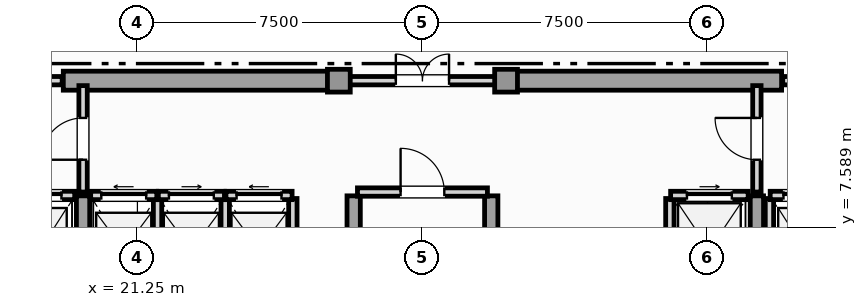
"""IFC4 building model, lengths in metres.
Left out: names, types, materials, properties, quantities, classifications, styles, units other than length and angle.
Written with IfcOpenShell. Run it as: python <this file> out.ifc"""

import sys

from ifc_helpers import new_model, si_unit, direction, frame, frame_2d, origin, origin_2d, place, context, subcontext, project, spatial, rectangle, extrude, element, fill, save


model = new_model("IFC4")
c1 = context("Model", 3, precision=1e-05, world=origin(), true_north=direction((0.0, 1.0)))
c2 = subcontext(c1, "Body", "Model", "MODEL_VIEW")
j1 = project(units=[si_unit("LENGTHUNIT", "METRE"), si_unit("PLANEANGLEUNIT", "RADIAN")], contexts=[c1])
p1 = place(None, origin())
s1 = spatial("IfcSite", under=j1, at=p1, CompositionType="ELEMENT")
p2 = place(p1, origin())
s2 = spatial("IfcBuilding", under=s1, at=p2, CompositionType="ELEMENT")
p3 = place(p2, frame((0.0, 0.0, 357.85)))
s3 = spatial("IfcBuildingStorey", under=s2, at=p3, CompositionType="ELEMENT", Elevation=357.85)
for number, where, z_axis, x_axis in (
    (1, (19.3, 11.45, 0.0), (0.0, 0.0, 1.0), (1.0, 0.0, 0.0)),
    (2, (30.9, 11.45, 0.0), (0.0, 0.0, 1.0), (1.0, 0.0, 0.0)),
):
    element("IfcWall", number, at=place(p3, frame(where, z_axis=z_axis, x_axis=x_axis)), inside=s3, PredefinedType="SHEAR", context=c2, shape_type="SweptSolid", body=[
        extrude(rectangle(XDim=7.3, YDim=0.5, at=frame_2d((3.65, 0.0))), origin(), (0.0, 0.0, 1.0), 4.14),
    ])
for number, where, z_axis, x_axis in (
    (3, (19.82, 0.92, 0.0), (0.0, 0.0, 1.0), (0.0, 1.0, 0.0)),
    (4, (26.94, 0.92, 0.0), (0.0, 0.0, 1.0), (0.0, 1.0, 0.0)),
    (5, (30.56, 0.92, 0.0), (0.0, 0.0, 1.0), (0.0, 1.0, 0.0)),
    (6, (37.55, 0.92, 0.0), (0.0, 0.0, 1.0), (0.0, 1.0, 0.0)),
):
    element("IfcWall", number, at=place(p3, frame(where, z_axis=z_axis, x_axis=x_axis)), inside=s3, PredefinedType="SHEAR", context=c2, shape_type="SweptSolid", body=[
        extrude(rectangle(XDim=7.5, YDim=0.35, at=frame_2d((3.75, 0.0))), origin(), (0.0, 0.0, 1.0), 4.14),
    ])
for number, where, z_axis, x_axis in (
    (7, (26.55, 11.45, 0.0), (0.0, 0.0, 1.0), (1.0, 0.0, 0.0)),
    (8, (30.95, 11.45, 0.0), (0.0, 0.0, 1.0), (1.0, 0.0, 0.0)),
):
    element("IfcColumn", number, at=place(p3, frame(where, z_axis=z_axis, x_axis=x_axis)), inside=s3, PredefinedType="COLUMN", context=c2, shape_type="SweptSolid", body=[
        extrude(rectangle(XDim=0.6, YDim=0.6, at=origin_2d()), origin(), (0.0, 0.0, 1.0), 4.4),
    ])
p4 = place(p3, frame((17.78, 8.43, 0.0), z_axis=(0.0, 0.0, 1.0), x_axis=(1.0, 0.0, 0.0)))
e9 = element("IfcWall", 9, at=p4, inside=s3, PredefinedType="SOLIDWALL", context=c2, shape_type="SweptSolid", body=[
    extrude(rectangle(XDim=1.82, YDim=0.22, at=frame_2d((0.91, 0.0))), origin(), (0.0, 0.0, 1.0), 4.14),
])
p5 = place(p4, frame((0.35, 0.0, 0.0)))
e10 = element("IfcOpeningElement", 10, at=p5, cuts=e9, PredefinedType="OPENING", context=c2, shape_type="SweptSolid", body=[
    extrude(rectangle(XDim=1.12, YDim=2.25, at=frame_2d((0.56, 1.125))), frame((0.0, 0.12, 0.0), z_axis=(0.0, -1.0, 0.0), x_axis=(1.0, 0.0, 0.0)), (0.0, 0.0, 1.0), 0.24),
])
p6 = place(p3, frame((37.88, 5.65, 0.0), z_axis=(0.0, 0.0, 1.0), x_axis=(0.0, 1.0, 0.0)))
e11 = element("IfcWall", 11, at=p6, inside=s3, PredefinedType="SOLIDWALL", context=c2, shape_type="SweptSolid", body=[
    extrude(rectangle(XDim=2.7, YDim=0.22, at=frame_2d((1.35, 0.0))), origin(), (0.0, 0.0, 1.0), 4.14),
])
p7 = place(p3, frame((37.9, 8.43, 0.0), z_axis=(0.0, 0.0, 1.0), x_axis=(1.0, 0.0, 0.0)))
e12 = element("IfcWall", 12, at=p7, inside=s3, PredefinedType="SOLIDWALL", context=c2, shape_type="SweptSolid", body=[
    extrude(rectangle(XDim=1.82, YDim=0.22, at=frame_2d((0.91, 0.0))), origin(), (0.0, 0.0, 1.0), 4.14),
])
p8 = place(p7, frame((0.35, 0.0, 0.0)))
e13 = element("IfcOpeningElement", 13, at=p8, cuts=e12, PredefinedType="OPENING", context=c2, shape_type="SweptSolid", body=[
    extrude(rectangle(XDim=1.12, YDim=2.25, at=frame_2d((0.56, 1.125))), frame((0.0, 0.12, 0.0), z_axis=(0.0, -1.0, 0.0), x_axis=(1.0, 0.0, 0.0)), (0.0, 0.0, 1.0), 0.24),
])
p9 = place(p3, frame((35.26, 5.65, 0.0), z_axis=(0.0, 0.0, 1.0), x_axis=(0.0, 1.0, 0.0)))
e14 = element("IfcWall", 14, at=p9, inside=s3, PredefinedType="SOLIDWALL", context=c2, shape_type="SweptSolid", body=[
    extrude(rectangle(XDim=2.7, YDim=0.22, at=frame_2d((1.35, 0.0))), origin(), (0.0, 0.0, 1.0), 4.14),
])
p10 = place(p3, frame((35.28, 8.43, 0.0), z_axis=(0.0, 0.0, 1.0), x_axis=(1.0, 0.0, 0.0)))
e15 = element("IfcWall", 15, at=p10, inside=s3, PredefinedType="SOLIDWALL", context=c2, shape_type="SweptSolid", body=[
    extrude(rectangle(XDim=2.04, YDim=0.22, at=frame_2d((1.02, 0.0))), origin(), (0.0, 0.0, 1.0), 4.14),
])
p11 = place(p10, frame((0.43, 0.0, 0.0)))
e16 = element("IfcOpeningElement", 16, at=p11, cuts=e15, PredefinedType="OPENING", context=c2, shape_type="SweptSolid", body=[
    extrude(rectangle(XDim=1.18, YDim=2.2, at=frame_2d((0.59, 1.1))), frame((0.0, 0.12, 0.0), z_axis=(0.0, -1.0, 0.0), x_axis=(1.0, 0.0, 0.0)), (0.0, 0.0, 1.0), 0.24),
])
p12 = place(p3, frame((21.78, 5.65, 0.0), z_axis=(0.0, 0.0, 1.0), x_axis=(0.0, 1.0, 0.0)))
e17 = element("IfcWall", 17, at=p12, inside=s3, PredefinedType="SOLIDWALL", context=c2, shape_type="SweptSolid", body=[
    extrude(rectangle(XDim=2.7, YDim=0.22, at=frame_2d((1.35, 0.0))), origin(), (0.0, 0.0, 1.0), 4.14),
])
p13 = place(p3, frame((20.02, 8.43, 0.0), z_axis=(0.0, 0.0, 1.0), x_axis=(1.0, 0.0, 0.0)))
e18 = element("IfcWall", 18, at=p13, inside=s3, PredefinedType="SOLIDWALL", context=c2, shape_type="SweptSolid", body=[
    extrude(rectangle(XDim=1.74, YDim=0.22, at=frame_2d((0.87, 0.0))), origin(), (0.0, 0.0, 1.0), 4.14),
])
p14 = place(p13, frame((0.28, 0.0, 0.0)))
e19 = element("IfcOpeningElement", 19, at=p14, cuts=e18, PredefinedType="OPENING", context=c2, shape_type="SweptSolid", body=[
    extrude(rectangle(XDim=1.18, YDim=2.2, at=frame_2d((0.59, 1.1))), frame((0.0, 0.12, 0.0), z_axis=(0.0, -1.0, 0.0), x_axis=(1.0, 0.0, 0.0)), (0.0, 0.0, 1.0), 0.24),
])
p15 = place(p3, frame((23.56, 5.65, 0.0), z_axis=(0.0, 0.0, 1.0), x_axis=(0.0, 1.0, 0.0)))
e20 = element("IfcWall", 20, at=p15, inside=s3, PredefinedType="SOLIDWALL", context=c2, shape_type="SweptSolid", body=[
    extrude(rectangle(XDim=2.7, YDim=0.22, at=frame_2d((1.35, 0.0))), origin(), (0.0, 0.0, 1.0), 4.14),
])
p16 = place(p3, frame((21.8, 8.43, 0.0), z_axis=(0.0, 0.0, 1.0), x_axis=(1.0, 0.0, 0.0)))
e21 = element("IfcWall", 21, at=p16, inside=s3, PredefinedType="SOLIDWALL", context=c2, shape_type="SweptSolid", body=[
    extrude(rectangle(XDim=1.74, YDim=0.22, at=frame_2d((0.87, 0.0))), origin(), (0.0, 0.0, 1.0), 4.14),
])
p17 = place(p16, frame((0.28, 0.0, 0.0)))
e22 = element("IfcOpeningElement", 22, at=p17, cuts=e21, PredefinedType="OPENING", context=c2, shape_type="SweptSolid", body=[
    extrude(rectangle(XDim=1.18, YDim=2.2, at=frame_2d((0.59, 1.1))), frame((0.0, 0.12, 0.0), z_axis=(0.0, -1.0, 0.0), x_axis=(1.0, 0.0, 0.0)), (0.0, 0.0, 1.0), 0.24),
])
p18 = place(p3, frame((25.34, 5.65, 0.0), z_axis=(0.0, 0.0, 1.0), x_axis=(0.0, 1.0, 0.0)))
e23 = element("IfcWall", 23, at=p18, inside=s3, PredefinedType="SOLIDWALL", context=c2, shape_type="SweptSolid", body=[
    extrude(rectangle(XDim=2.7, YDim=0.22, at=frame_2d((1.35, 0.0))), origin(), (0.0, 0.0, 1.0), 4.14),
])
p19 = place(p3, frame((23.58, 8.43, 0.0), z_axis=(0.0, 0.0, 1.0), x_axis=(1.0, 0.0, 0.0)))
e24 = element("IfcWall", 24, at=p19, inside=s3, PredefinedType="SOLIDWALL", context=c2, shape_type="SweptSolid", body=[
    extrude(rectangle(XDim=1.74, YDim=0.22, at=frame_2d((0.87, 0.0))), origin(), (0.0, 0.0, 1.0), 4.14),
])
p20 = place(p19, frame((0.28, 0.0, 0.0)))
e25 = element("IfcOpeningElement", 25, at=p20, cuts=e24, PredefinedType="OPENING", context=c2, shape_type="SweptSolid", body=[
    extrude(rectangle(XDim=1.18, YDim=2.2, at=frame_2d((0.59, 1.1))), frame((0.0, 0.12, 0.0), z_axis=(0.0, -1.0, 0.0), x_axis=(1.0, 0.0, 0.0)), (0.0, 0.0, 1.0), 0.24),
])
p21 = place(p3, frame((27.04, 8.52, 0.0), z_axis=(0.0, 0.0, 1.0), x_axis=(1.0, 0.0, 0.0)))
e26 = element("IfcWall", 26, at=p21, inside=s3, PredefinedType="SOLIDWALL", context=c2, shape_type="SweptSolid", body=[
    extrude(rectangle(XDim=3.42, YDim=0.22, at=frame_2d((1.71, 0.0))), origin(), (0.0, 0.0, 1.0), 4.14),
])
p22 = place(p21, frame((1.135, 0.0, 0.0)))
e27 = element("IfcOpeningElement", 27, at=p22, cuts=e26, PredefinedType="OPENING", context=c2, shape_type="SweptSolid", body=[
    extrude(rectangle(XDim=1.15, YDim=2.2, at=frame_2d((0.575, 1.1))), frame((0.0, 0.12, 0.0), z_axis=(0.0, -1.0, 0.0), x_axis=(1.0, 0.0, 0.0)), (0.0, 0.0, 1.0), 0.24),
])
p23 = place(p3, frame((19.82, 8.52, 0.0), z_axis=(0.0, 0.0, 1.0), x_axis=(0.0, 1.0, 0.0)))
e28 = element("IfcWall", 28, at=p23, inside=s3, PredefinedType="SOLIDWALL", context=c2, shape_type="SweptSolid", body=[
    extrude(rectangle(XDim=2.8, YDim=0.22, at=frame_2d((1.4, 0.0))), origin(), (0.0, 0.0, 1.0), 3.595),
])
p24 = place(p23, frame((0.85, 0.0, 0.0)))
e29 = element("IfcOpeningElement", 29, at=p24, cuts=e28, PredefinedType="OPENING", context=c2, shape_type="SweptSolid", body=[
    extrude(rectangle(XDim=1.1, YDim=2.2, at=frame_2d((0.55, 1.1))), frame((0.0, 0.12, 0.0), z_axis=(0.0, -1.0, 0.0), x_axis=(1.0, 0.0, 0.0)), (0.0, 0.0, 1.0), 0.24),
])
p25 = place(p3, frame((37.55, 8.52, 0.0), z_axis=(0.0, 0.0, 1.0), x_axis=(0.0, 1.0, 0.0)))
e30 = element("IfcWall", 30, at=p25, inside=s3, PredefinedType="SOLIDWALL", context=c2, shape_type="SweptSolid", body=[
    extrude(rectangle(XDim=2.8, YDim=0.22, at=frame_2d((1.4, 0.0))), origin(), (0.0, 0.0, 1.0), 3.595),
])
p26 = place(p25, frame((0.85, 0.0, 0.0)))
e31 = element("IfcOpeningElement", 31, at=p26, cuts=e30, PredefinedType="OPENING", context=c2, shape_type="SweptSolid", body=[
    extrude(rectangle(XDim=1.1, YDim=2.2, at=frame_2d((0.55, 1.1))), frame((0.0, 0.12, 0.0), z_axis=(0.0, -1.0, 0.0), x_axis=(1.0, 0.0, 0.0)), (0.0, 0.0, 1.0), 0.24),
])
p27 = place(p3, frame((16.23, 11.45, 0.0), z_axis=(0.0, 0.0, 1.0), x_axis=(1.0, 0.0, 0.0)))
e32 = element("IfcWall", 32, at=p27, inside=s3, PredefinedType="SOLIDWALL", context=c2, shape_type="SweptSolid", body=[
    extrude(rectangle(XDim=3.04, YDim=0.22, at=frame_2d((1.52, 0.0))), origin(), (0.0, 0.0, 1.0), 4.14),
])
p28 = place(p27, frame((0.97, 0.0, 0.0)))
e33 = element("IfcOpeningElement", 33, at=p28, cuts=e32, PredefinedType="OPENING", context=c2, shape_type="SweptSolid", body=[
    extrude(rectangle(XDim=1.1, YDim=2.2, at=frame_2d((0.55, 1.1))), frame((0.0, 0.12, 0.0), z_axis=(0.0, -1.0, 0.0), x_axis=(1.0, 0.0, 0.0)), (0.0, 0.0, 1.0), 0.24),
])
p29 = place(p3, frame((26.63, 11.45, 0.0), z_axis=(0.0, 0.0, 1.0), x_axis=(1.0, 0.0, 0.0)))
e34 = element("IfcWall", 34, at=p29, inside=s3, PredefinedType="SOLIDWALL", context=c2, shape_type="SweptSolid", body=[
    extrude(rectangle(XDim=4.24, YDim=0.22, at=frame_2d((2.12, 0.0))), origin(), (0.0, 0.0, 1.0), 4.14),
])
p30 = place(p29, frame((1.42, 0.0, 0.0)))
e35 = element("IfcOpeningElement", 35, at=p30, cuts=e34, PredefinedType="OPENING", context=c2, shape_type="SweptSolid", body=[
    extrude(rectangle(XDim=1.4, YDim=2.2, at=frame_2d((0.7, 1.1))), frame((0.0, 0.12, 0.0), z_axis=(0.0, -1.0, 0.0), x_axis=(1.0, 0.0, 0.0)), (0.0, 0.0, 1.0), 0.24),
])
p31 = place(p3, frame((38.23, 11.45, 0.0), z_axis=(0.0, 0.0, 1.0), x_axis=(1.0, 0.0, 0.0)))
e36 = element("IfcWall", 36, at=p31, inside=s3, PredefinedType="SOLIDWALL", context=c2, shape_type="SweptSolid", body=[
    extrude(rectangle(XDim=3.04, YDim=0.22, at=frame_2d((1.52, 0.0))), origin(), (0.0, 0.0, 1.0), 4.14),
])
p32 = place(p31, frame((0.97, 0.0, 0.0)))
e37 = element("IfcOpeningElement", 37, at=p32, cuts=e36, PredefinedType="OPENING", context=c2, shape_type="SweptSolid", body=[
    extrude(rectangle(XDim=1.1, YDim=2.2, at=frame_2d((0.55, 1.1))), frame((0.0, 0.12, 0.0), z_axis=(0.0, -1.0, 0.0), x_axis=(1.0, 0.0, 0.0)), (0.0, 0.0, 1.0), 0.24),
])
p33 = place(p5, origin())
e38 = element("IfcDoor", 38, at=p33, inside=s3, OperationType="SLIDING_TO_RIGHT", PredefinedType="DOOR", context=c2, shape_type="SweptSolid", body=[
    extrude(rectangle(XDim=1.12, YDim=2.25, at=frame_2d((0.56, 1.125))), frame((0.0, 0.025, 0.0), z_axis=(0.0, -1.0, 0.0), x_axis=(1.0, 0.0, 0.0)), (0.0, 0.0, 1.0), 0.05),
])
fill(e10, e38)
p34 = place(p8, origin())
e39 = element("IfcDoor", 39, at=p34, inside=s3, OperationType="SLIDING_TO_LEFT", PredefinedType="DOOR", context=c2, shape_type="SweptSolid", body=[
    extrude(rectangle(XDim=1.12, YDim=2.25, at=frame_2d((0.56, 1.125))), frame((0.0, 0.025, 0.0), z_axis=(0.0, -1.0, 0.0), x_axis=(1.0, 0.0, 0.0)), (0.0, 0.0, 1.0), 0.05),
])
fill(e13, e39)
p35 = place(p11, origin())
e40 = element("IfcDoor", 40, at=p35, inside=s3, OperationType="SLIDING_TO_RIGHT", PredefinedType="DOOR", context=c2, shape_type="SweptSolid", body=[
    extrude(rectangle(XDim=1.18, YDim=2.2, at=frame_2d((0.59, 1.1))), frame((0.0, 0.025, 0.0), z_axis=(0.0, -1.0, 0.0), x_axis=(1.0, 0.0, 0.0)), (0.0, 0.0, 1.0), 0.05),
])
fill(e16, e40)
p36 = place(p14, origin())
e41 = element("IfcDoor", 41, at=p36, inside=s3, OperationType="SLIDING_TO_LEFT", PredefinedType="DOOR", context=c2, shape_type="SweptSolid", body=[
    extrude(rectangle(XDim=1.18, YDim=2.2, at=frame_2d((0.59, 1.1))), frame((0.0, 0.025, 0.0), z_axis=(0.0, -1.0, 0.0), x_axis=(1.0, 0.0, 0.0)), (0.0, 0.0, 1.0), 0.05),
])
fill(e19, e41)
p37 = place(p17, origin())
e42 = element("IfcDoor", 42, at=p37, inside=s3, OperationType="SLIDING_TO_RIGHT", PredefinedType="DOOR", context=c2, shape_type="SweptSolid", body=[
    extrude(rectangle(XDim=1.18, YDim=2.2, at=frame_2d((0.59, 1.1))), frame((0.0, 0.025, 0.0), z_axis=(0.0, -1.0, 0.0), x_axis=(1.0, 0.0, 0.0)), (0.0, 0.0, 1.0), 0.05),
])
fill(e22, e42)
p38 = place(p20, origin())
e43 = element("IfcDoor", 43, at=p38, inside=s3, OperationType="SLIDING_TO_LEFT", PredefinedType="DOOR", context=c2, shape_type="SweptSolid", body=[
    extrude(rectangle(XDim=1.18, YDim=2.2, at=frame_2d((0.59, 1.1))), frame((0.0, 0.025, 0.0), z_axis=(0.0, -1.0, 0.0), x_axis=(1.0, 0.0, 0.0)), (0.0, 0.0, 1.0), 0.05),
])
fill(e25, e43)
p39 = place(p22, origin())
e44 = element("IfcDoor", 44, at=p39, inside=s3, OperationType="SINGLE_SWING_LEFT", PredefinedType="DOOR", context=c2, shape_type="SweptSolid", body=[
    extrude(rectangle(XDim=1.15, YDim=2.2, at=frame_2d((0.575, 1.1))), frame((0.0, 0.025, 0.0), z_axis=(0.0, -1.0, 0.0), x_axis=(1.0, 0.0, 0.0)), (0.0, 0.0, 1.0), 0.05),
])
fill(e27, e44)
p40 = place(p24, origin())
e45 = element("IfcDoor", 45, at=p40, inside=s3, OperationType="SINGLE_SWING_LEFT", PredefinedType="DOOR", context=c2, shape_type="SweptSolid", body=[
    extrude(rectangle(XDim=1.1, YDim=2.2, at=frame_2d((0.55, 1.1))), frame((0.0, 0.025, 0.0), z_axis=(0.0, -1.0, 0.0), x_axis=(1.0, 0.0, 0.0)), (0.0, 0.0, 1.0), 0.05),
])
fill(e29, e45)
p41 = place(p26, origin())
e46 = element("IfcDoor", 46, at=p41, inside=s3, OperationType="SINGLE_SWING_RIGHT", PredefinedType="DOOR", context=c2, shape_type="SweptSolid", body=[
    extrude(rectangle(XDim=1.1, YDim=2.2, at=frame_2d((0.55, 1.1))), frame((0.0, 0.025, 0.0), z_axis=(0.0, -1.0, 0.0), x_axis=(1.0, 0.0, 0.0)), (0.0, 0.0, 1.0), 0.05),
])
fill(e31, e46)
p42 = place(p30, origin())
e47 = element("IfcDoor", 47, at=p42, inside=s3, OperationType="DOUBLE_DOOR_SINGLE_SWING", PredefinedType="DOOR", context=c2, shape_type="SweptSolid", body=[
    extrude(rectangle(XDim=1.4, YDim=2.2, at=frame_2d((0.7, 1.1))), frame((0.0, 0.025, 0.0), z_axis=(0.0, -1.0, 0.0), x_axis=(1.0, 0.0, 0.0)), (0.0, 0.0, 1.0), 0.05),
])
fill(e35, e47)
save(model, sys.argv[1])
